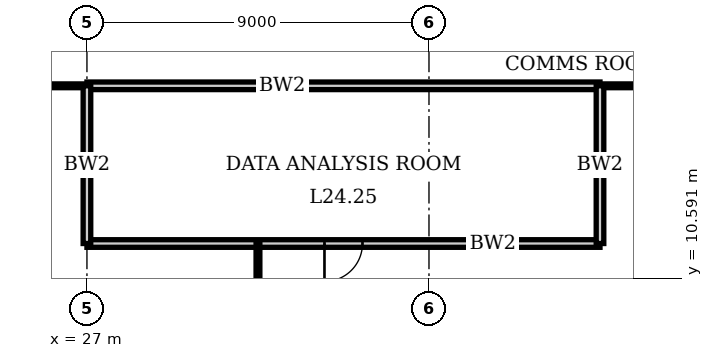
"""IFC4 building model, lengths in metres.
Left out: names, types, materials, properties, quantities, classifications, styles, units other than length and angle.
Written with IfcOpenShell. Run it as: python <this file> out.ifc"""

import sys

from ifc_helpers import new_model, si_unit, direction, frame, frame_2d, origin, place, context, subcontext, project, spatial, rectangle, extrude, element, fill, save


model = new_model("IFC4")
c1 = context("Model", 3, precision=1e-05, world=origin(), true_north=direction((0.0, 1.0)))
c2 = subcontext(c1, "Body", "Model", "MODEL_VIEW")
j1 = project(units=[si_unit("LENGTHUNIT", "METRE"), si_unit("PLANEANGLEUNIT", "RADIAN")], contexts=[c1])
p1 = place(None, origin())
s1 = spatial("IfcSite", under=j1, at=p1, CompositionType="ELEMENT")
p2 = place(p1, origin())
s2 = spatial("IfcBuilding", under=s1, at=p2, CompositionType="ELEMENT")
p3 = place(p2, frame((0.0, 0.0, 101.0)))
s3 = spatial("IfcBuildingStorey", under=s2, at=p3, CompositionType="ELEMENT", Elevation=101.0)
p4 = place(p3, frame((27.0, 11.5, 0.0), z_axis=(0.0, 0.0, 1.0), x_axis=(1.0, 0.0, 0.0)))
e1 = element("IfcWall", 1, at=p4, inside=s3, PredefinedType="SOLIDWALL", context=c2, shape_type="SweptSolid", body=[
    extrude(rectangle(XDim=13.5, YDim=0.2, at=frame_2d((6.75, 0.0))), origin(), (0.0, 0.0, 1.0), 3.75),
])
p5 = place(p4, frame((6.25, 0.0, 0.0)))
e2 = element("IfcOpeningElement", 2, at=p5, cuts=e1, PredefinedType="OPENING", context=c2, shape_type="SweptSolid", body=[
    extrude(rectangle(XDim=1.0, YDim=2.4, at=frame_2d((0.5, 1.2))), frame((0.0, 0.11, 0.0), z_axis=(0.0, -1.0, 0.0), x_axis=(1.0, 0.0, 0.0)), (0.0, 0.0, 1.0), 0.22),
])
p6 = place(p3, frame((27.0, 15.65, 0.0), z_axis=(0.0, 0.0, 1.0), x_axis=(1.0, 0.0, 0.0)))
e3 = element("IfcWall", 3, at=p6, inside=s3, PredefinedType="SOLIDWALL", context=c2, shape_type="SweptSolid", body=[
    extrude(rectangle(XDim=13.5, YDim=0.2, at=frame_2d((6.75, 0.0))), origin(), (0.0, 0.0, 1.0), 3.75),
])
p7 = place(p3, frame((15.65, 15.65, 0.0), z_axis=(0.0, 0.0, 1.0), x_axis=(1.0, 0.0, 0.0)))
e4 = element("IfcWall", 4, at=p7, inside=s3, PredefinedType="PARTITIONING", context=c2, shape_type="SweptSolid", body=[
    extrude(rectangle(XDim=11.35, YDim=0.1, at=frame_2d((5.675, 0.0))), origin(), (0.0, 0.0, 1.0), 3.75),
])
p8 = place(p7, frame((5.175, 0.0, 0.0)))
e5 = element("IfcOpeningElement", 5, at=p8, cuts=e4, PredefinedType="OPENING", context=c2, shape_type="SweptSolid", body=[
    extrude(rectangle(XDim=1.0, YDim=2.4, at=frame_2d((0.5, 1.2))), frame((0.0, 0.06, 0.0), z_axis=(0.0, -1.0, 0.0), x_axis=(1.0, 0.0, 0.0)), (0.0, 0.0, 1.0), 0.12),
])
p9 = place(p3, frame((40.5, 15.65, 0.0), z_axis=(0.0, 0.0, 1.0), x_axis=(1.0, 0.0, 0.0)))
e6 = element("IfcWall", 6, at=p9, inside=s3, PredefinedType="PARTITIONING", context=c2, shape_type="SweptSolid", body=[
    extrude(rectangle(XDim=6.85, YDim=0.1, at=frame_2d((3.425, 0.0))), origin(), (0.0, 0.0, 1.0), 3.75),
])
p10 = place(p9, frame((2.925, 0.0, 0.0)))
e7 = element("IfcOpeningElement", 7, at=p10, cuts=e6, PredefinedType="OPENING", context=c2, shape_type="SweptSolid", body=[
    extrude(rectangle(XDim=1.0, YDim=2.4, at=frame_2d((0.5, 1.2))), frame((0.0, 0.06, 0.0), z_axis=(0.0, -1.0, 0.0), x_axis=(1.0, 0.0, 0.0)), (0.0, 0.0, 1.0), 0.12),
])
p11 = place(p3, frame((27.0, 11.5, 0.0), z_axis=(0.0, 0.0, 1.0), x_axis=(0.0, 1.0, 0.0)))
e8 = element("IfcWall", 8, at=p11, inside=s3, PredefinedType="SOLIDWALL", context=c2, shape_type="SweptSolid", body=[
    extrude(rectangle(XDim=4.15, YDim=0.2, at=frame_2d((2.075, 0.0))), origin(), (0.0, 0.0, 1.0), 3.05),
])
p12 = place(p3, frame((31.5, 0.31, 0.0), z_axis=(0.0, 0.0, 1.0), x_axis=(0.0, 1.0, 0.0)))
e9 = element("IfcWall", 9, at=p12, inside=s3, PredefinedType="PARTITIONING", context=c2, shape_type="SweptSolid", body=[
    extrude(rectangle(XDim=11.2, YDim=0.1, at=frame_2d((5.6, 0.0))), origin(), (0.0, 0.0, 1.0), 3.75),
])
p13 = place(p3, frame((40.5, 11.5, 0.0), z_axis=(0.0, 0.0, 1.0), x_axis=(0.0, 1.0, 0.0)))
e10 = element("IfcWall", 10, at=p13, inside=s3, PredefinedType="SOLIDWALL", context=c2, shape_type="SweptSolid", body=[
    extrude(rectangle(XDim=4.15, YDim=0.2, at=frame_2d((2.075, 0.0))), origin(), (0.0, 0.0, 1.0), 3.75),
])
p14 = place(p5, origin())
e11 = element("IfcDoor", 11, at=p14, inside=s3, OperationType="SINGLE_SWING_LEFT", PredefinedType="DOOR", context=c2, shape_type="SweptSolid", body=[
    extrude(rectangle(XDim=1.0, YDim=2.4, at=frame_2d((0.5, 1.2))), frame((0.0, 0.035, 0.0), z_axis=(0.0, -1.0, 0.0), x_axis=(1.0, 0.0, 0.0)), (0.0, 0.0, 1.0), 0.07),
])
fill(e2, e11)
save(model, sys.argv[1])
